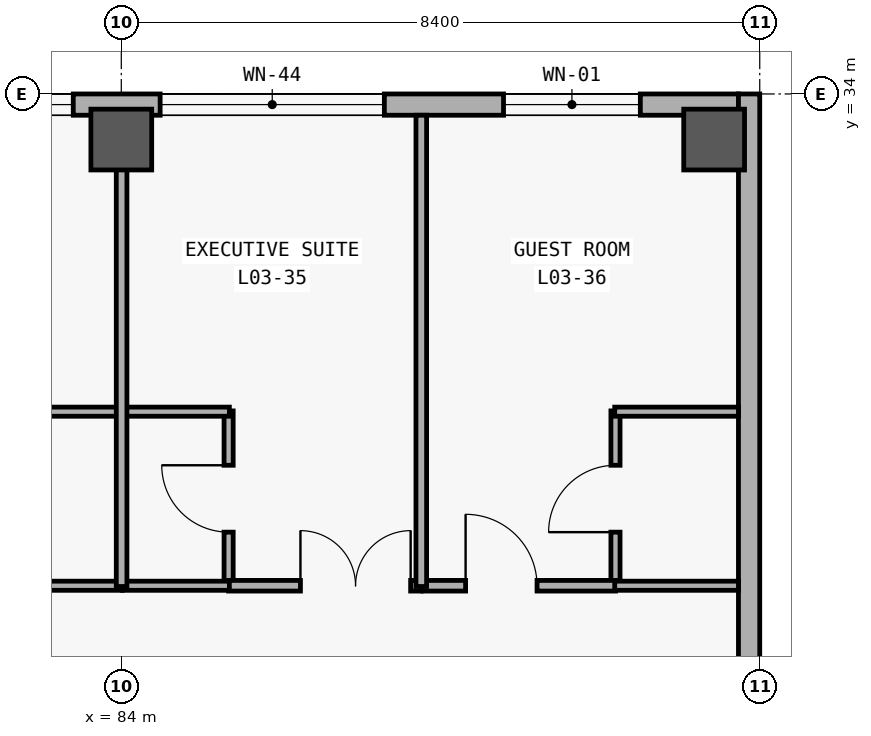
"""IFC4 building model, lengths in metres.
Left out: names, types, materials, properties, quantities, classifications, styles, units other than length and angle.
Written with IfcOpenShell. Run it as: python <this file> out.ifc"""

import sys

from ifc_helpers import new_model, si_unit, direction, frame, frame_2d, origin, origin_2d, place, context, subcontext, project, spatial, rectangle, extrude, element, fill, save


model = new_model("IFC4")
c1 = context("Model", 3, precision=1e-05, world=origin(), true_north=direction((0.0, 1.0)))
c2 = subcontext(c1, "Body", "Model", "MODEL_VIEW")
j1 = project(units=[si_unit("LENGTHUNIT", "METRE"), si_unit("PLANEANGLEUNIT", "RADIAN")], contexts=[c1])
p1 = place(None, origin())
s1 = spatial("IfcSite", under=j1, at=p1, CompositionType="ELEMENT")
p2 = place(p1, origin())
s2 = spatial("IfcBuilding", under=s1, at=p2, CompositionType="ELEMENT")
p3 = place(p2, frame((0.0, 0.0, 15.0)))
s3 = spatial("IfcBuildingStorey", under=s2, at=p3, CompositionType="ELEMENT", Elevation=15.0)
for number, where, z_axis, x_axis in (
    (1, (84.0, 33.4, 0.0), (0.0, 0.0, 1.0), (1.0, 0.0, 0.0)),
    (2, (91.8, 33.4, 0.0), (0.0, 0.0, 1.0), (1.0, 0.0, 0.0)),
):
    element("IfcColumn", number, at=place(p3, frame(where, z_axis=z_axis, x_axis=x_axis)), inside=s3, PredefinedType="COLUMN", context=c2, shape_type="SweptSolid", body=[
        extrude(rectangle(XDim=0.8, YDim=0.8, at=origin_2d()), origin(), (0.0, 0.0, 1.0), 4.2),
    ])
p4 = place(p3, frame((8.68, 33.86, 0.0), z_axis=(0.0, 0.0, 1.0), x_axis=(1.0, 0.0, 0.0)))
e3 = element("IfcWall", 3, at=p4, inside=s3, PredefinedType="SOLIDWALL", context=c2, shape_type="SweptSolid", body=[
    extrude(rectangle(XDim=83.44, YDim=0.28, at=frame_2d((41.72, 0.0))), origin(), (0.0, 0.0, 1.0), 3.92),
])
p5 = place(p4, frame((4.895, 0.0, 0.85)))
e4 = element("IfcOpeningElement", 4, at=p5, cuts=e3, PredefinedType="OPENING", context=c2, shape_type="SweptSolid", body=[
    extrude(rectangle(XDim=2.6, YDim=2.2, at=frame_2d((1.3, 1.1))), frame((0.0, 0.15, 0.0), z_axis=(0.0, -1.0, 0.0), x_axis=(1.0, 0.0, 0.0)), (0.0, 0.0, 1.0), 0.3),
])
p6 = place(p4, frame((13.371, 0.0, 0.85)))
e5 = element("IfcOpeningElement", 5, at=p6, cuts=e3, PredefinedType="OPENING", context=c2, shape_type="SweptSolid", body=[
    extrude(rectangle(XDim=1.7, YDim=2.0, at=frame_2d((0.85, 1.0))), frame((0.0, 0.15, 0.0), z_axis=(0.0, -1.0, 0.0), x_axis=(1.0, 0.0, 0.0)), (0.0, 0.0, 1.0), 0.3),
])
p7 = place(p4, frame((17.015, 0.0, 0.85)))
e6 = element("IfcOpeningElement", 6, at=p7, cuts=e3, PredefinedType="OPENING", context=c2, shape_type="SweptSolid", body=[
    extrude(rectangle(XDim=2.3, YDim=2.05, at=frame_2d((1.15, 1.025))), frame((0.0, 0.15, 0.0), z_axis=(0.0, -1.0, 0.0), x_axis=(1.0, 0.0, 0.0)), (0.0, 0.0, 1.0), 0.3),
])
p8 = place(p4, frame((20.732, 0.0, 0.85)))
e7 = element("IfcOpeningElement", 7, at=p8, cuts=e3, PredefinedType="OPENING", context=c2, shape_type="SweptSolid", body=[
    extrude(rectangle(XDim=2.75, YDim=2.1, at=frame_2d((1.375, 1.05))), frame((0.0, 0.15, 0.0), z_axis=(0.0, -1.0, 0.0), x_axis=(1.0, 0.0, 0.0)), (0.0, 0.0, 1.0), 0.3),
])
p9 = place(p4, frame((25.46, 0.0, 0.85)))
e8 = element("IfcOpeningElement", 8, at=p9, cuts=e3, PredefinedType="OPENING", context=c2, shape_type="SweptSolid", body=[
    extrude(rectangle(XDim=1.18, YDim=1.5, at=frame_2d((0.59, 0.75))), frame((0.0, 0.15, 0.0), z_axis=(0.0, -1.0, 0.0), x_axis=(1.0, 0.0, 0.0)), (0.0, 0.0, 1.0), 0.3),
])
p10 = place(p4, frame((29.352, 0.0, 0.85)))
e9 = element("IfcOpeningElement", 9, at=p10, cuts=e3, PredefinedType="OPENING", context=c2, shape_type="SweptSolid", body=[
    extrude(rectangle(XDim=1.28, YDim=1.6, at=frame_2d((0.64, 0.8))), frame((0.0, 0.15, 0.0), z_axis=(0.0, -1.0, 0.0), x_axis=(1.0, 0.0, 0.0)), (0.0, 0.0, 1.0), 0.3),
])
p11 = place(p4, frame((33.245, 0.0, 0.85)))
e10 = element("IfcOpeningElement", 10, at=p11, cuts=e3, PredefinedType="OPENING", context=c2, shape_type="SweptSolid", body=[
    extrude(rectangle(XDim=1.38, YDim=1.7, at=frame_2d((0.69, 0.85))), frame((0.0, 0.15, 0.0), z_axis=(0.0, -1.0, 0.0), x_axis=(1.0, 0.0, 0.0)), (0.0, 0.0, 1.0), 0.3),
])
p12 = place(p4, frame((37.138, 0.0, 0.85)))
e11 = element("IfcOpeningElement", 11, at=p12, cuts=e3, PredefinedType="OPENING", context=c2, shape_type="SweptSolid", body=[
    extrude(rectangle(XDim=1.48, YDim=1.8, at=frame_2d((0.74, 0.9))), frame((0.0, 0.15, 0.0), z_axis=(0.0, -1.0, 0.0), x_axis=(1.0, 0.0, 0.0)), (0.0, 0.0, 1.0), 0.3),
])
p13 = place(p4, frame((41.031, 0.0, 0.85)))
e12 = element("IfcOpeningElement", 12, at=p13, cuts=e3, PredefinedType="OPENING", context=c2, shape_type="SweptSolid", body=[
    extrude(rectangle(XDim=1.58, YDim=1.85, at=frame_2d((0.79, 0.925))), frame((0.0, 0.15, 0.0), z_axis=(0.0, -1.0, 0.0), x_axis=(1.0, 0.0, 0.0)), (0.0, 0.0, 1.0), 0.3),
])
p14 = place(p4, frame((44.923, 0.0, 0.85)))
e13 = element("IfcOpeningElement", 13, at=p14, cuts=e3, PredefinedType="OPENING", context=c2, shape_type="SweptSolid", body=[
    extrude(rectangle(XDim=1.68, YDim=1.9, at=frame_2d((0.84, 0.95))), frame((0.0, 0.15, 0.0), z_axis=(0.0, -1.0, 0.0), x_axis=(1.0, 0.0, 0.0)), (0.0, 0.0, 1.0), 0.3),
])
p15 = place(p4, frame((48.816, 0.0, 0.85)))
e14 = element("IfcOpeningElement", 14, at=p15, cuts=e3, PredefinedType="OPENING", context=c2, shape_type="SweptSolid", body=[
    extrude(rectangle(XDim=1.78, YDim=1.95, at=frame_2d((0.89, 0.975))), frame((0.0, 0.15, 0.0), z_axis=(0.0, -1.0, 0.0), x_axis=(1.0, 0.0, 0.0)), (0.0, 0.0, 1.0), 0.3),
])
p16 = place(p4, frame((52.71, 0.0, 0.85)))
e15 = element("IfcOpeningElement", 15, at=p16, cuts=e3, PredefinedType="OPENING", context=c2, shape_type="SweptSolid", body=[
    extrude(rectangle(XDim=1.88, YDim=1.95, at=frame_2d((0.94, 0.975))), frame((0.0, 0.15, 0.0), z_axis=(0.0, -1.0, 0.0), x_axis=(1.0, 0.0, 0.0)), (0.0, 0.0, 1.0), 0.3),
])
p17 = place(p4, frame((56.567, 0.0, 0.85)))
e16 = element("IfcOpeningElement", 16, at=p17, cuts=e3, PredefinedType="OPENING", context=c2, shape_type="SweptSolid", body=[
    extrude(rectangle(XDim=2.05, YDim=1.95, at=frame_2d((1.025, 0.975))), frame((0.0, 0.15, 0.0), z_axis=(0.0, -1.0, 0.0), x_axis=(1.0, 0.0, 0.0)), (0.0, 0.0, 1.0), 0.3),
])
p18 = place(p4, frame((60.444, 0.0, 0.85)))
e17 = element("IfcOpeningElement", 17, at=p18, cuts=e3, PredefinedType="OPENING", context=c2, shape_type="SweptSolid", body=[
    extrude(rectangle(XDim=2.18, YDim=1.95, at=frame_2d((1.09, 0.975))), frame((0.0, 0.15, 0.0), z_axis=(0.0, -1.0, 0.0), x_axis=(1.0, 0.0, 0.0)), (0.0, 0.0, 1.0), 0.3),
])
p19 = place(p4, frame((64.287, 0.0, 0.85)))
e18 = element("IfcOpeningElement", 18, at=p19, cuts=e3, PredefinedType="OPENING", context=c2, shape_type="SweptSolid", body=[
    extrude(rectangle(XDim=2.38, YDim=1.95, at=frame_2d((1.19, 0.975))), frame((0.0, 0.15, 0.0), z_axis=(0.0, -1.0, 0.0), x_axis=(1.0, 0.0, 0.0)), (0.0, 0.0, 1.0), 0.3),
])
p20 = place(p4, frame((68.181, 0.0, 0.85)))
e19 = element("IfcOpeningElement", 19, at=p20, cuts=e3, PredefinedType="OPENING", context=c2, shape_type="SweptSolid", body=[
    extrude(rectangle(XDim=2.48, YDim=2.0, at=frame_2d((1.24, 1.0))), frame((0.0, 0.15, 0.0), z_axis=(0.0, -1.0, 0.0), x_axis=(1.0, 0.0, 0.0)), (0.0, 0.0, 1.0), 0.3),
])
p21 = place(p4, frame((72.038, 0.0, 0.85)))
e20 = element("IfcOpeningElement", 20, at=p21, cuts=e3, PredefinedType="OPENING", context=c2, shape_type="SweptSolid", body=[
    extrude(rectangle(XDim=2.65, YDim=2.0, at=frame_2d((1.325, 1.0))), frame((0.0, 0.15, 0.0), z_axis=(0.0, -1.0, 0.0), x_axis=(1.0, 0.0, 0.0)), (0.0, 0.0, 1.0), 0.3),
])
p22 = place(p4, frame((75.831, 0.0, 0.85)))
e21 = element("IfcOpeningElement", 21, at=p22, cuts=e3, PredefinedType="OPENING", context=c2, shape_type="SweptSolid", body=[
    extrude(rectangle(XDim=2.95, YDim=2.05, at=frame_2d((1.475, 1.025))), frame((0.0, 0.15, 0.0), z_axis=(0.0, -1.0, 0.0), x_axis=(1.0, 0.0, 0.0)), (0.0, 0.0, 1.0), 0.3),
])
p23 = place(p4, frame((80.349, 0.0, 0.85)))
e22 = element("IfcOpeningElement", 22, at=p23, cuts=e3, PredefinedType="OPENING", context=c2, shape_type="SweptSolid", body=[
    extrude(rectangle(XDim=1.8, YDim=1.8, at=frame_2d((0.9, 0.9))), frame((0.0, 0.15, 0.0), z_axis=(0.0, -1.0, 0.0), x_axis=(1.0, 0.0, 0.0)), (0.0, 0.0, 1.0), 0.3),
])
p24 = place(p3, frame((92.26, 34.0, 0.0), z_axis=(0.0, 0.0, 1.0), x_axis=(0.0, -1.0, 0.0)))
e23 = element("IfcWall", 23, at=p24, inside=s3, PredefinedType="SOLIDWALL", context=c2, shape_type="SweptSolid", body=[
    extrude(rectangle(XDim=28.0, YDim=0.28, at=frame_2d((14.0, 0.0))), origin(), (0.0, 0.0, 1.0), 3.92),
])
p25 = place(p24, frame((21.9, 0.0, 0.95)))
e24 = element("IfcOpeningElement", 24, at=p25, cuts=e23, PredefinedType="OPENING", context=c2, shape_type="SweptSolid", body=[
    extrude(rectangle(XDim=1.6, YDim=1.6, at=frame_2d((0.8, 0.8))), frame((0.0, 0.15, 0.0), z_axis=(0.0, -1.0, 0.0), x_axis=(1.0, 0.0, 0.0)), (0.0, 0.0, 1.0), 0.3),
])
p26 = place(p3, frame((85.412, 27.52, 0.0), z_axis=(0.0, 0.0, 1.0), x_axis=(0.0, 1.0, 0.0)))
e25 = element("IfcWall", 25, at=p26, inside=s3, PredefinedType="PARTITIONING", context=c2, shape_type="SweptSolid", body=[
    extrude(rectangle(XDim=2.31, YDim=0.12, at=frame_2d((1.155, 0.0))), origin(), (0.0, 0.0, 1.0), 3.02),
])
p27 = place(p26, frame((0.715, 0.0, 0.0)))
e26 = element("IfcOpeningElement", 26, at=p27, cuts=e25, PredefinedType="OPENING", context=c2, shape_type="SweptSolid", body=[
    extrude(rectangle(XDim=0.88, YDim=2.15, at=frame_2d((0.44, 1.075))), frame((0.0, 0.07, 0.0), z_axis=(0.0, -1.0, 0.0), x_axis=(1.0, 0.0, 0.0)), (0.0, 0.0, 1.0), 0.14),
])
p28 = place(p3, frame((90.502, 27.52, 0.0), z_axis=(0.0, 0.0, 1.0), x_axis=(0.0, 1.0, 0.0)))
e27 = element("IfcWall", 27, at=p28, inside=s3, PredefinedType="PARTITIONING", context=c2, shape_type="SweptSolid", body=[
    extrude(rectangle(XDim=2.31, YDim=0.12, at=frame_2d((1.155, 0.0))), origin(), (0.0, 0.0, 1.0), 3.02),
])
p29 = place(p28, frame((0.715, 0.0, 0.0)))
e28 = element("IfcOpeningElement", 28, at=p29, cuts=e27, PredefinedType="OPENING", context=c2, shape_type="SweptSolid", body=[
    extrude(rectangle(XDim=0.88, YDim=2.15, at=frame_2d((0.44, 1.075))), frame((0.0, 0.07, 0.0), z_axis=(0.0, -1.0, 0.0), x_axis=(1.0, 0.0, 0.0)), (0.0, 0.0, 1.0), 0.14),
])
p30 = place(p3, frame((85.412, 27.53, 0.0), z_axis=(0.0, 0.0, 1.0), x_axis=(1.0, 0.0, 0.0)))
e29 = element("IfcWall", 29, at=p30, inside=s3, PredefinedType="PARTITIONING", context=c2, shape_type="SweptSolid", body=[
    extrude(rectangle(XDim=2.535, YDim=0.14, at=frame_2d((1.268, 0.0))), origin(), (0.0, 0.0, 1.0), 3.02),
])
p31 = place(p30, frame((0.945, 0.0, 0.0)))
e30 = element("IfcOpeningElement", 30, at=p31, cuts=e29, PredefinedType="OPENING", context=c2, shape_type="SweptSolid", body=[
    extrude(rectangle(XDim=1.45, YDim=2.3, at=frame_2d((0.725, 1.15))), frame((0.0, 0.08, 0.0), z_axis=(0.0, -1.0, 0.0), x_axis=(1.0, 0.0, 0.0)), (0.0, 0.0, 1.0), 0.16),
])
p32 = place(p3, frame((87.967, 27.53, 0.0), z_axis=(0.0, 0.0, 1.0), x_axis=(1.0, 0.0, 0.0)))
e31 = element("IfcWall", 31, at=p32, inside=s3, PredefinedType="PARTITIONING", context=c2, shape_type="SweptSolid", body=[
    extrude(rectangle(XDim=2.535, YDim=0.14, at=frame_2d((1.268, 0.0))), origin(), (0.0, 0.0, 1.0), 3.02),
])
p33 = place(p32, frame((0.563, 0.0, 0.0)))
e32 = element("IfcOpeningElement", 32, at=p33, cuts=e31, PredefinedType="OPENING", context=c2, shape_type="SweptSolid", body=[
    extrude(rectangle(XDim=0.94, YDim=2.2, at=frame_2d((0.47, 1.1))), frame((0.0, 0.08, 0.0), z_axis=(0.0, -1.0, 0.0), x_axis=(1.0, 0.0, 0.0)), (0.0, 0.0, 1.0), 0.16),
])
for number, where, z_axis, x_axis in (
    (33, (82.606, 27.53, 0.0), (0.0, 0.0, 1.0), (1.0, 0.0, 0.0)),
    (34, (82.606, 29.82, 0.0), (0.0, 0.0, 1.0), (1.0, 0.0, 0.0)),
):
    element("IfcWall", number, at=place(p3, frame(where, z_axis=z_axis, x_axis=x_axis)), inside=s3, PredefinedType="PARTITIONING", context=c2, shape_type="SweptSolid", body=[
        extrude(rectangle(XDim=1.408, YDim=0.12, at=frame_2d((0.704, 0.0))), origin(), (0.0, 0.0, 1.0), 3.02),
    ])
for number, where, z_axis, x_axis in (
    (35, (84.014, 27.53, 0.0), (0.0, 0.0, 1.0), (1.0, 0.0, 0.0)),
    (36, (84.014, 29.82, 0.0), (0.0, 0.0, 1.0), (1.0, 0.0, 0.0)),
):
    element("IfcWall", number, at=place(p3, frame(where, z_axis=z_axis, x_axis=x_axis)), inside=s3, PredefinedType="PARTITIONING", context=c2, shape_type="SweptSolid", body=[
        extrude(rectangle(XDim=1.408, YDim=0.12, at=frame_2d((0.704, 0.0))), origin(), (0.0, 0.0, 1.0), 3.02),
    ])
for number, where, z_axis, x_axis in (
    (37, (90.492, 27.53, 0.0), (0.0, 0.0, 1.0), (1.0, 0.0, 0.0)),
    (38, (90.492, 29.82, 0.0), (0.0, 0.0, 1.0), (1.0, 0.0, 0.0)),
):
    element("IfcWall", number, at=place(p3, frame(where, z_axis=z_axis, x_axis=x_axis)), inside=s3, PredefinedType="PARTITIONING", context=c2, shape_type="SweptSolid", body=[
        extrude(rectangle(XDim=1.628, YDim=0.12, at=frame_2d((0.814, 0.0))), origin(), (0.0, 0.0, 1.0), 3.02),
    ])
for number, where, z_axis, x_axis in (
    (39, (84.004, 27.52, 0.0), (0.0, 0.0, 1.0), (0.0, 1.0, 0.0)),
    (40, (87.947, 27.52, 0.0), (0.0, 0.0, 1.0), (0.0, 1.0, 0.0)),
):
    element("IfcWall", number, at=place(p3, frame(where, z_axis=z_axis, x_axis=x_axis)), inside=s3, PredefinedType="PARTITIONING", context=c2, shape_type="SweptSolid", body=[
        extrude(rectangle(XDim=6.2, YDim=0.14, at=frame_2d((3.1, 0.0))), origin(), (0.0, 0.0, 1.0), 3.02),
    ])
p34 = place(p21, origin())
e41 = element("IfcWindow", 41, at=p34, inside=s3, PartitioningType="SINGLE_PANEL", PredefinedType="WINDOW", context=c2, shape_type="SweptSolid", body=[
    extrude(rectangle(XDim=2.65, YDim=2.0, at=frame_2d((1.325, 1.0))), frame((0.0, 0.03, 0.0), z_axis=(0.0, -1.0, 0.0), x_axis=(1.0, 0.0, 0.0)), (0.0, 0.0, 1.0), 0.06),
])
fill(e20, e41)
p35 = place(p22, origin())
e42 = element("IfcWindow", 42, at=p35, inside=s3, PartitioningType="SINGLE_PANEL", PredefinedType="WINDOW", context=c2, shape_type="SweptSolid", body=[
    extrude(rectangle(XDim=2.95, YDim=2.05, at=frame_2d((1.475, 1.025))), frame((0.0, 0.03, 0.0), z_axis=(0.0, -1.0, 0.0), x_axis=(1.0, 0.0, 0.0)), (0.0, 0.0, 1.0), 0.06),
])
fill(e21, e42)
p36 = place(p23, origin())
e43 = element("IfcWindow", 43, at=p36, inside=s3, PartitioningType="SINGLE_PANEL", PredefinedType="WINDOW", context=c2, shape_type="SweptSolid", body=[
    extrude(rectangle(XDim=1.8, YDim=1.8, at=frame_2d((0.9, 0.9))), frame((0.0, 0.03, 0.0), z_axis=(0.0, -1.0, 0.0), x_axis=(1.0, 0.0, 0.0)), (0.0, 0.0, 1.0), 0.06),
])
fill(e22, e43)
p37 = place(p27, origin())
e44 = element("IfcDoor", 44, at=p37, inside=s3, OperationType="SINGLE_SWING_RIGHT", PredefinedType="DOOR", context=c2, shape_type="SweptSolid", body=[
    extrude(rectangle(XDim=0.88, YDim=2.15, at=frame_2d((0.44, 1.075))), frame((0.0, 0.025, 0.0), z_axis=(0.0, -1.0, 0.0), x_axis=(1.0, 0.0, 0.0)), (0.0, 0.0, 1.0), 0.05),
])
fill(e26, e44)
p38 = place(p29, origin())
e45 = element("IfcDoor", 45, at=p38, inside=s3, OperationType="SINGLE_SWING_LEFT", PredefinedType="DOOR", context=c2, shape_type="SweptSolid", body=[
    extrude(rectangle(XDim=0.88, YDim=2.15, at=frame_2d((0.44, 1.075))), frame((0.0, 0.025, 0.0), z_axis=(0.0, -1.0, 0.0), x_axis=(1.0, 0.0, 0.0)), (0.0, 0.0, 1.0), 0.05),
])
fill(e28, e45)
p39 = place(p31, origin())
e46 = element("IfcDoor", 46, at=p39, inside=s3, OperationType="DOUBLE_DOOR_SINGLE_SWING", PredefinedType="DOOR", context=c2, shape_type="SweptSolid", body=[
    extrude(rectangle(XDim=1.45, YDim=2.3, at=frame_2d((0.725, 1.15))), frame((0.0, 0.025, 0.0), z_axis=(0.0, -1.0, 0.0), x_axis=(1.0, 0.0, 0.0)), (0.0, 0.0, 1.0), 0.05),
])
fill(e30, e46)
p40 = place(p33, origin())
e47 = element("IfcDoor", 47, at=p40, inside=s3, OperationType="SINGLE_SWING_LEFT", PredefinedType="DOOR", context=c2, shape_type="SweptSolid", body=[
    extrude(rectangle(XDim=0.94, YDim=2.2, at=frame_2d((0.47, 1.1))), frame((0.0, 0.025, 0.0), z_axis=(0.0, -1.0, 0.0), x_axis=(1.0, 0.0, 0.0)), (0.0, 0.0, 1.0), 0.05),
])
fill(e32, e47)
save(model, sys.argv[1])
